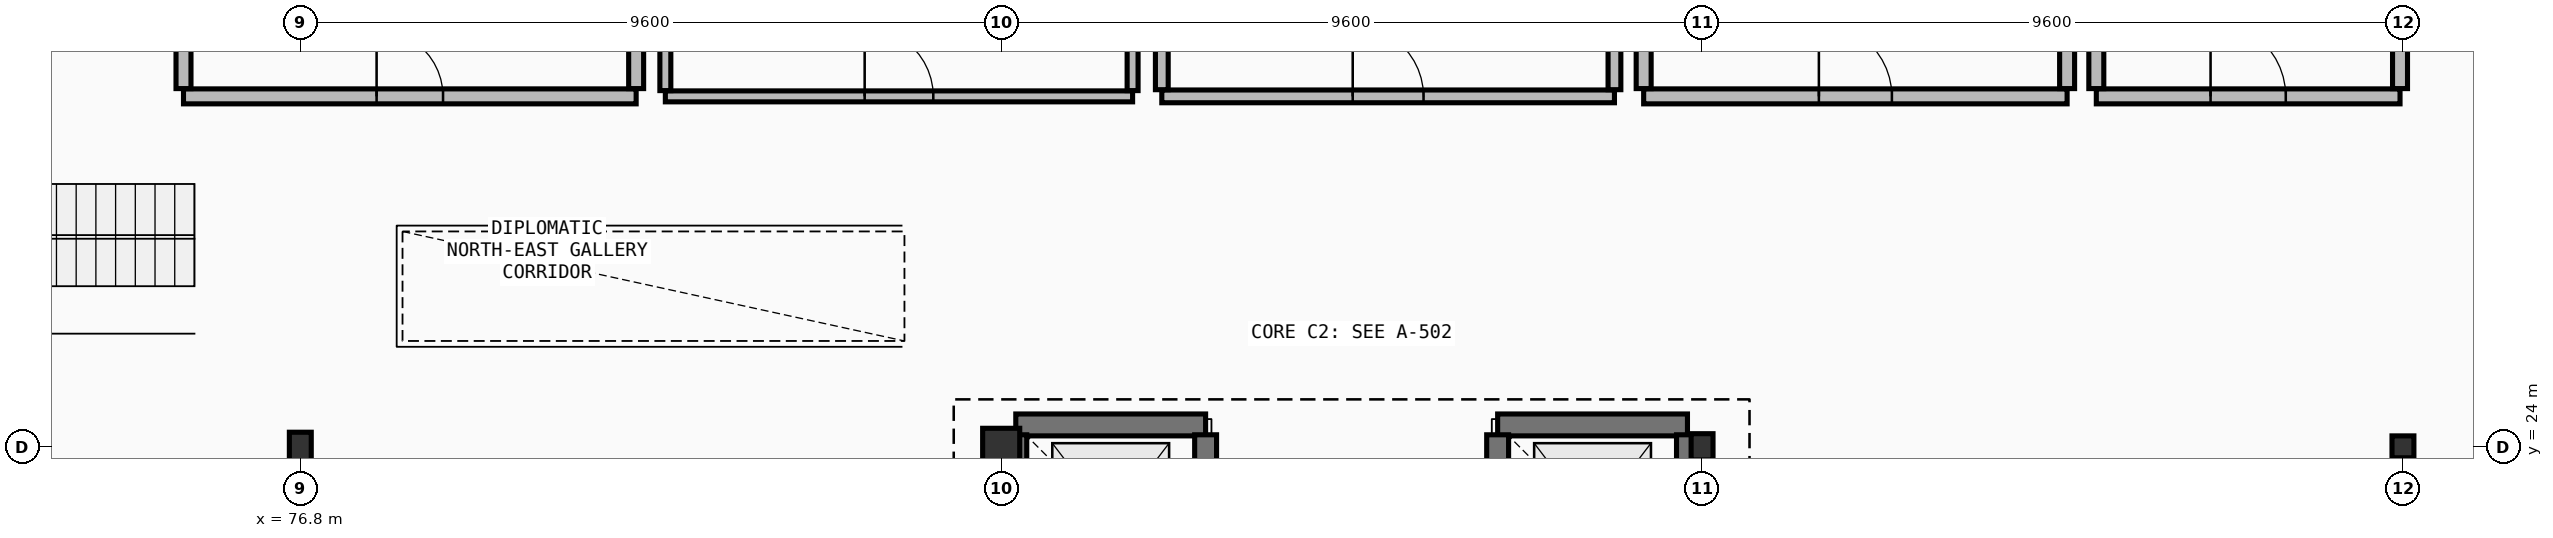
"""IFC4 building model, lengths in metres.
Left out: names, types, materials, properties, quantities, classifications, styles, units other than length and angle.
Written with IfcOpenShell. Run it as: python <this file> out.ifc"""

import sys

from ifc_helpers import new_model, si_unit, direction, frame, frame_2d, origin, origin_2d, place, context, subcontext, project, spatial, rectangle, hollow_circle, i_section, extrude, element, fill, save


model = new_model("IFC4")
c1 = context("Model", 3, precision=1e-05, world=origin(), true_north=direction((0.0, 1.0)))
c2 = subcontext(c1, "Body", "Model", "MODEL_VIEW")
j1 = project(units=[si_unit("LENGTHUNIT", "METRE"), si_unit("PLANEANGLEUNIT", "RADIAN")], contexts=[c1])
p1 = place(None, origin())
s1 = spatial("IfcSite", under=j1, at=p1, CompositionType="ELEMENT")
p2 = place(p1, origin())
s2 = spatial("IfcBuilding", under=s1, at=p2, CompositionType="ELEMENT")
p3 = place(p2, frame((0.0, 0.0, 20.4)))
s3 = spatial("IfcBuildingStorey", under=s2, at=p3, CompositionType="ELEMENT", Elevation=20.4)
p4 = place(p3, frame((76.8, 24.0, 0.0), z_axis=(0.0, 0.0, 1.0), x_axis=(1.0, 0.0, 0.0)))
e1 = element("IfcColumn", 1, at=p4, inside=s3, PredefinedType="COLUMN", context=c2, shape_type="SweptSolid", body=[
    extrude(i_section(OverallWidth=0.3, OverallDepth=0.4, WebThickness=0.013, FlangeThickness=0.024, FilletRadius=0.027, at=origin_2d()), origin(), (0.0, 0.0, 1.0), 4.5),
])
p5 = place(p3, frame((86.4, 24.0, 0.0), z_axis=(0.0, 0.0, 1.0), x_axis=(1.0, 0.0, 0.0)))
e2 = element("IfcColumn", 2, at=p5, inside=s3, PredefinedType="COLUMN", context=c2, shape_type="SweptSolid", body=[
    extrude(hollow_circle(Radius=0.254, WallThickness=0.025, at=origin_2d()), origin(), (0.0, 0.0, 1.0), 4.5),
])
p6 = place(p3, frame((96.0, 24.0, 0.0), z_axis=(0.0, 0.0, 1.0), x_axis=(1.0, 0.0, 0.0)))
e3 = element("IfcColumn", 3, at=p6, inside=s3, PredefinedType="COLUMN", context=c2, shape_type="SweptSolid", body=[
    extrude(i_section(OverallWidth=0.3, OverallDepth=0.36, WebThickness=0.012, FlangeThickness=0.022, FilletRadius=0.027, at=origin_2d()), origin(), (0.0, 0.0, 1.0), 4.5),
])
p7 = place(p3, frame((105.6, 24.0, 0.0), z_axis=(0.0, 0.0, 1.0), x_axis=(1.0, 0.0, 0.0)))
e4 = element("IfcColumn", 4, at=p7, inside=s3, PredefinedType="COLUMN", context=c2, shape_type="SweptSolid", body=[
    extrude(i_section(OverallWidth=0.3, OverallDepth=0.3, WebThickness=0.011, FlangeThickness=0.019, FilletRadius=0.027, at=origin_2d()), origin(), (0.0, 0.0, 1.0), 4.5),
])
p8 = place(p3, frame((89.2, 24.3, 0.0), z_axis=(0.0, 0.0, 1.0), x_axis=(-1.0, 0.0, 0.0)))
e5 = element("IfcWall", 5, at=p8, inside=s3, PredefinedType="SHEAR", context=c2, shape_type="SweptSolid", body=[
    extrude(rectangle(XDim=2.6, YDim=0.3, at=frame_2d((1.3, 0.0))), origin(), (0.0, 0.0, 1.0), 4.25),
])
p9 = place(p3, frame((89.2, 21.665, 0.0), z_axis=(0.0, 0.0, 1.0), x_axis=(0.0, 1.0, 0.0)))
e6 = element("IfcWall", 6, at=p9, inside=s3, PredefinedType="SHEAR", context=c2, shape_type="SweptSolid", body=[
    extrude(rectangle(XDim=2.5, YDim=0.3, at=frame_2d((1.25, 0.0))), origin(), (0.0, 0.0, 1.0), 4.25),
])
p10 = place(p9, frame((0.55, 0.0, 0.0)))
e7 = element("IfcOpeningElement", 7, at=p10, cuts=e6, PredefinedType="OPENING", context=c2, shape_type="SweptSolid", body=[
    extrude(rectangle(XDim=1.4, YDim=2.26, at=frame_2d((0.7, 1.13))), frame((0.0, 0.16, 0.0), z_axis=(0.0, -1.0, 0.0), x_axis=(1.0, 0.0, 0.0)), (0.0, 0.0, 1.0), 0.32),
])
p11 = place(p3, frame((86.6, 24.165, 0.0), z_axis=(0.0, 0.0, 1.0), x_axis=(0.0, -1.0, 0.0)))
e8 = element("IfcWall", 8, at=p11, inside=s3, PredefinedType="SHEAR", context=c2, shape_type="SweptSolid", body=[
    extrude(rectangle(XDim=2.5, YDim=0.3, at=frame_2d((1.25, 0.0))), origin(), (0.0, 0.0, 1.0), 4.25),
])
p12 = place(p3, frame((95.8, 24.3, 0.0), z_axis=(0.0, 0.0, 1.0), x_axis=(-1.0, 0.0, 0.0)))
e9 = element("IfcWall", 9, at=p12, inside=s3, PredefinedType="SHEAR", context=c2, shape_type="SweptSolid", body=[
    extrude(rectangle(XDim=2.6, YDim=0.3, at=frame_2d((1.3, 0.0))), origin(), (0.0, 0.0, 1.0), 4.25),
])
p13 = place(p3, frame((95.8, 21.835, 0.0), z_axis=(0.0, 0.0, 1.0), x_axis=(0.0, 1.0, 0.0)))
e10 = element("IfcWall", 10, at=p13, inside=s3, PredefinedType="SHEAR", context=c2, shape_type="SweptSolid", body=[
    extrude(rectangle(XDim=2.33, YDim=0.3, at=frame_2d((1.165, 0.0))), origin(), (0.0, 0.0, 1.0), 4.25),
])
p14 = place(p3, frame((93.2, 24.165, 0.0), z_axis=(0.0, 0.0, 1.0), x_axis=(0.0, -1.0, 0.0)))
e11 = element("IfcWall", 11, at=p14, inside=s3, PredefinedType="SHEAR", context=c2, shape_type="SweptSolid", body=[
    extrude(rectangle(XDim=2.5, YDim=0.3, at=frame_2d((1.25, 0.0))), origin(), (0.0, 0.0, 1.0), 4.25),
])
p15 = place(p14, frame((0.65, 0.0, 0.0)))
e12 = element("IfcOpeningElement", 12, at=p15, cuts=e11, PredefinedType="OPENING", context=c2, shape_type="SweptSolid", body=[
    extrude(rectangle(XDim=1.2, YDim=2.2, at=frame_2d((0.6, 1.1))), frame((0.0, 0.16, 0.0), z_axis=(0.0, -1.0, 0.0), x_axis=(1.0, 0.0, 0.0)), (0.0, 0.0, 1.0), 0.32),
])
p16 = place(p3, frame((75.2, 28.8, 0.0), z_axis=(0.0, 0.0, 1.0), x_axis=(1.0, 0.0, 0.0)))
e13 = element("IfcWall", 13, at=p16, inside=s3, PredefinedType="SOLIDWALL", context=c2, shape_type="SweptSolid", body=[
    extrude(rectangle(XDim=6.2, YDim=0.205, at=frame_2d((3.1, 0.0))), origin(), (0.0, 0.0, 1.0), 3.67),
])
p17 = place(p16, frame((2.645, 0.0, 0.0)))
e14 = element("IfcOpeningElement", 14, at=p17, cuts=e13, PredefinedType="OPENING", context=c2, shape_type="SweptSolid", body=[
    extrude(rectangle(XDim=0.91, YDim=2.08, at=frame_2d((0.455, 1.04))), frame((0.0, 0.113, 0.0), z_axis=(0.0, -1.0, 0.0), x_axis=(1.0, 0.0, 0.0)), (0.0, 0.0, 1.0), 0.225),
])
p18 = place(p3, frame((81.4, 28.906, 0.0), z_axis=(0.0, 0.0, 1.0), x_axis=(0.0, 1.0, 0.0)))
e15 = element("IfcWall", 15, at=p18, inside=s3, PredefinedType="SOLIDWALL", context=c2, shape_type="SweptSolid", body=[
    extrude(rectangle(XDim=10.493, YDim=0.205, at=frame_2d((5.247, 0.0))), origin(), (0.0, 0.0, 1.0), 3.63),
])
p19 = place(p3, frame((75.2, 39.293, 0.0), z_axis=(0.0, 0.0, 1.0), x_axis=(0.0, -1.0, 0.0)))
e16 = element("IfcWall", 16, at=p19, inside=s3, PredefinedType="SOLIDWALL", context=c2, shape_type="SweptSolid", body=[
    extrude(rectangle(XDim=10.387, YDim=0.205, at=frame_2d((5.193, 0.0))), origin(), (0.0, 0.0, 1.0), 3.77),
])
p20 = place(p3, frame((81.8, 28.8, 0.0), z_axis=(0.0, 0.0, 1.0), x_axis=(1.0, 0.0, 0.0)))
e17 = element("IfcWall", 17, at=p20, inside=s3, PredefinedType="PARTITIONING", context=c2, shape_type="SweptSolid", body=[
    extrude(rectangle(XDim=6.4, YDim=0.15, at=frame_2d((3.2, 0.0))), origin(), (0.0, 0.0, 1.0), 3.32),
])
p21 = place(p20, frame((2.73, 0.0, 0.0)))
e18 = element("IfcOpeningElement", 18, at=p21, cuts=e17, PredefinedType="OPENING", context=c2, shape_type="SweptSolid", body=[
    extrude(rectangle(XDim=0.94, YDim=2.1, at=frame_2d((0.47, 1.05))), frame((0.0, 0.085, 0.0), z_axis=(0.0, -1.0, 0.0), x_axis=(1.0, 0.0, 0.0)), (0.0, 0.0, 1.0), 0.17),
])
p22 = place(p3, frame((88.2, 28.879, 0.0), z_axis=(0.0, 0.0, 1.0), x_axis=(0.0, 1.0, 0.0)))
e19 = element("IfcWall", 19, at=p22, inside=s3, PredefinedType="PARTITIONING", context=c2, shape_type="SweptSolid", body=[
    extrude(rectangle(XDim=10.521, YDim=0.15, at=frame_2d((5.26, 0.0))), origin(), (0.0, 0.0, 1.0), 3.73),
])
p23 = place(p3, frame((81.8, 39.321, 0.0), z_axis=(0.0, 0.0, 1.0), x_axis=(0.0, -1.0, 0.0)))
e20 = element("IfcWall", 20, at=p23, inside=s3, PredefinedType="PARTITIONING", context=c2, shape_type="SweptSolid", body=[
    extrude(rectangle(XDim=10.442, YDim=0.15, at=frame_2d((5.221, 0.0))), origin(), (0.0, 0.0, 1.0), 3.63),
])
p24 = place(p3, frame((88.6, 28.8, 0.0), z_axis=(0.0, 0.0, 1.0), x_axis=(1.0, 0.0, 0.0)))
e21 = element("IfcWall", 21, at=p24, inside=s3, PredefinedType="PARTITIONING", context=c2, shape_type="SweptSolid", body=[
    extrude(rectangle(XDim=6.2, YDim=0.175, at=frame_2d((3.1, 0.0))), origin(), (0.0, 0.0, 1.0), 4.25),
])
p25 = place(p24, frame((2.615, 0.0, 0.0)))
e22 = element("IfcOpeningElement", 22, at=p25, cuts=e21, PredefinedType="OPENING", context=c2, shape_type="SweptSolid", body=[
    extrude(rectangle(XDim=0.97, YDim=2.1, at=frame_2d((0.485, 1.05))), frame((0.0, 0.097, 0.0), z_axis=(0.0, -1.0, 0.0), x_axis=(1.0, 0.0, 0.0)), (0.0, 0.0, 1.0), 0.195),
])
p26 = place(p3, frame((94.8, 28.892, 0.0), z_axis=(0.0, 0.0, 1.0), x_axis=(0.0, 1.0, 0.0)))
e23 = element("IfcWall", 23, at=p26, inside=s3, PredefinedType="PARTITIONING", context=c2, shape_type="SweptSolid", body=[
    extrude(rectangle(XDim=10.508, YDim=0.175, at=frame_2d((5.254, 0.0))), origin(), (0.0, 0.0, 1.0), 3.73),
])
p27 = place(p3, frame((88.6, 39.309, 0.0), z_axis=(0.0, 0.0, 1.0), x_axis=(0.0, -1.0, 0.0)))
e24 = element("IfcWall", 24, at=p27, inside=s3, PredefinedType="PARTITIONING", context=c2, shape_type="SweptSolid", body=[
    extrude(rectangle(XDim=10.417, YDim=0.175, at=frame_2d((5.208, 0.0))), origin(), (0.0, 0.0, 1.0), 3.73),
])
p28 = place(p3, frame((95.2, 28.8, 0.0), z_axis=(0.0, 0.0, 1.0), x_axis=(1.0, 0.0, 0.0)))
e25 = element("IfcWall", 25, at=p28, inside=s3, PredefinedType="SOLIDWALL", context=c2, shape_type="SweptSolid", body=[
    extrude(rectangle(XDim=5.8, YDim=0.205, at=frame_2d((2.9, 0.0))), origin(), (0.0, 0.0, 1.0), 3.52),
])
p29 = place(p28, frame((2.4, 0.0, 0.0)))
e26 = element("IfcOpeningElement", 26, at=p29, cuts=e25, PredefinedType="OPENING", context=c2, shape_type="SweptSolid", body=[
    extrude(rectangle(XDim=1.0, YDim=2.12, at=frame_2d((0.5, 1.06))), frame((0.0, 0.113, 0.0), z_axis=(0.0, -1.0, 0.0), x_axis=(1.0, 0.0, 0.0)), (0.0, 0.0, 1.0), 0.225),
])
p30 = place(p3, frame((101.0, 28.906, 0.0), z_axis=(0.0, 0.0, 1.0), x_axis=(0.0, 1.0, 0.0)))
e27 = element("IfcWall", 27, at=p30, inside=s3, PredefinedType="SOLIDWALL", context=c2, shape_type="SweptSolid", body=[
    extrude(rectangle(XDim=10.493, YDim=0.205, at=frame_2d((5.247, 0.0))), origin(), (0.0, 0.0, 1.0), 3.84),
])
p31 = place(p3, frame((95.2, 39.293, 0.0), z_axis=(0.0, 0.0, 1.0), x_axis=(0.0, -1.0, 0.0)))
e28 = element("IfcWall", 28, at=p31, inside=s3, PredefinedType="SOLIDWALL", context=c2, shape_type="SweptSolid", body=[
    extrude(rectangle(XDim=10.387, YDim=0.205, at=frame_2d((5.193, 0.0))), origin(), (0.0, 0.0, 1.0), 3.73),
])
p32 = place(p3, frame((101.4, 28.8, 0.0), z_axis=(0.0, 0.0, 1.0), x_axis=(1.0, 0.0, 0.0)))
e29 = element("IfcWall", 29, at=p32, inside=s3, PredefinedType="SOLIDWALL", context=c2, shape_type="SweptSolid", body=[
    extrude(rectangle(XDim=4.16, YDim=0.205, at=frame_2d((2.08, 0.0))), origin(), (0.0, 0.0, 1.0), 3.83),
])
p33 = place(p32, frame((1.565, 0.0, 0.0)))
e30 = element("IfcOpeningElement", 30, at=p33, cuts=e29, PredefinedType="OPENING", context=c2, shape_type="SweptSolid", body=[
    extrude(rectangle(XDim=1.03, YDim=2.14, at=frame_2d((0.515, 1.07))), frame((0.0, 0.113, 0.0), z_axis=(0.0, -1.0, 0.0), x_axis=(1.0, 0.0, 0.0)), (0.0, 0.0, 1.0), 0.225),
])
p34 = place(p3, frame((105.56, 28.906, 0.0), z_axis=(0.0, 0.0, 1.0), x_axis=(0.0, 1.0, 0.0)))
e31 = element("IfcWall", 31, at=p34, inside=s3, PredefinedType="SOLIDWALL", context=c2, shape_type="SweptSolid", body=[
    extrude(rectangle(XDim=10.493, YDim=0.205, at=frame_2d((5.247, 0.0))), origin(), (0.0, 0.0, 1.0), 3.78),
])
p35 = place(p3, frame((101.4, 39.293, 0.0), z_axis=(0.0, 0.0, 1.0), x_axis=(0.0, -1.0, 0.0)))
e32 = element("IfcWall", 32, at=p35, inside=s3, PredefinedType="SOLIDWALL", context=c2, shape_type="SweptSolid", body=[
    extrude(rectangle(XDim=10.387, YDim=0.205, at=frame_2d((5.193, 0.0))), origin(), (0.0, 0.0, 1.0), 3.84),
])
p36 = place(p17, origin())
e33 = element("IfcDoor", 33, at=p36, inside=s3, OperationType="SINGLE_SWING_RIGHT", PredefinedType="DOOR", context=c2, shape_type="SweptSolid", body=[
    extrude(rectangle(XDim=0.91, YDim=2.08, at=frame_2d((0.455, 1.04))), frame((0.0, 0.025, 0.0), z_axis=(0.0, -1.0, 0.0), x_axis=(1.0, 0.0, 0.0)), (0.0, 0.0, 1.0), 0.05),
])
fill(e14, e33)
p37 = place(p21, origin())
e34 = element("IfcDoor", 34, at=p37, inside=s3, OperationType="SINGLE_SWING_LEFT", PredefinedType="DOOR", context=c2, shape_type="SweptSolid", body=[
    extrude(rectangle(XDim=0.94, YDim=2.1, at=frame_2d((0.47, 1.05))), frame((0.0, 0.025, 0.0), z_axis=(0.0, -1.0, 0.0), x_axis=(1.0, 0.0, 0.0)), (0.0, 0.0, 1.0), 0.05),
])
fill(e18, e34)
p38 = place(p25, origin())
e35 = element("IfcDoor", 35, at=p38, inside=s3, OperationType="SINGLE_SWING_RIGHT", PredefinedType="DOOR", context=c2, shape_type="SweptSolid", body=[
    extrude(rectangle(XDim=0.97, YDim=2.1, at=frame_2d((0.485, 1.05))), frame((0.0, 0.025, 0.0), z_axis=(0.0, -1.0, 0.0), x_axis=(1.0, 0.0, 0.0)), (0.0, 0.0, 1.0), 0.05),
])
fill(e22, e35)
p39 = place(p29, origin())
e36 = element("IfcDoor", 36, at=p39, inside=s3, OperationType="SINGLE_SWING_LEFT", PredefinedType="DOOR", context=c2, shape_type="SweptSolid", body=[
    extrude(rectangle(XDim=1.0, YDim=2.12, at=frame_2d((0.5, 1.06))), frame((0.0, 0.025, 0.0), z_axis=(0.0, -1.0, 0.0), x_axis=(1.0, 0.0, 0.0)), (0.0, 0.0, 1.0), 0.05),
])
fill(e26, e36)
p40 = place(p33, origin())
e37 = element("IfcDoor", 37, at=p40, inside=s3, OperationType="SINGLE_SWING_RIGHT", PredefinedType="DOOR", context=c2, shape_type="SweptSolid", body=[
    extrude(rectangle(XDim=1.03, YDim=2.14, at=frame_2d((0.515, 1.07))), frame((0.0, 0.025, 0.0), z_axis=(0.0, -1.0, 0.0), x_axis=(1.0, 0.0, 0.0)), (0.0, 0.0, 1.0), 0.05),
])
fill(e30, e37)
save(model, sys.argv[1])
